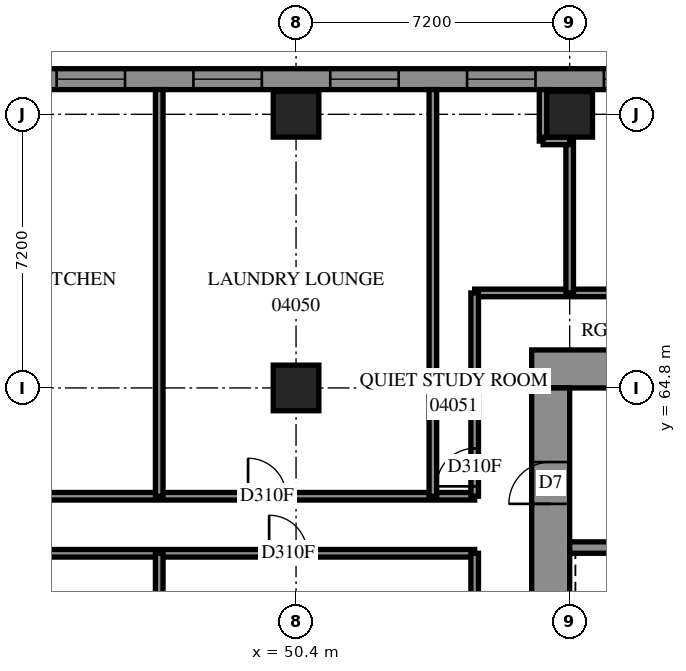
"""IFC4 building model, lengths in metres.
Left out: names, types, materials, properties, quantities, classifications, styles, units other than length and angle.
Written with IfcOpenShell. Run it as: python <this file> out.ifc"""

import sys

from ifc_helpers import new_model, si_unit, direction, frame, frame_2d, origin, origin_2d, place, context, subcontext, project, spatial, polyline, rectangle, outline, extrude, element, fill, save


model = new_model("IFC4")
c1 = context("Model", 3, precision=1e-05, world=origin(), true_north=direction((0.0, 1.0)))
c2 = subcontext(c1, "Body", "Model", "MODEL_VIEW")
j1 = project(units=[si_unit("LENGTHUNIT", "METRE"), si_unit("PLANEANGLEUNIT", "RADIAN")], contexts=[c1])
p1 = place(None, origin())
s1 = spatial("IfcSite", under=j1, at=p1, CompositionType="ELEMENT")
p2 = place(p1, origin())
s2 = spatial("IfcBuilding", under=s1, at=p2, CompositionType="ELEMENT")
p3 = place(p2, frame((0.0, 0.0, 18.6)))
s3 = spatial("IfcBuildingStorey", under=s2, at=p3, CompositionType="ELEMENT", Elevation=18.6)
for number, where, z_axis, x_axis in (
    (1, (50.4, 64.8, 0.0), (0.0, 0.0, 1.0), (1.0, 0.0, 0.0)),
    (2, (50.4, 72.0, 0.0), (0.0, 0.0, 1.0), (1.0, 0.0, 0.0)),
    (3, (57.6, 72.0, 0.0), (0.0, 0.0, 1.0), (1.0, 0.0, 0.0)),
):
    element("IfcColumn", number, at=place(p3, frame(where, z_axis=z_axis, x_axis=x_axis)), inside=s3, PredefinedType="COLUMN", context=c2, shape_type="SweptSolid", body=[
        extrude(rectangle(XDim=1.2, YDim=1.2, at=origin_2d()), origin(), (0.0, 0.0, 1.0), 3.8),
    ])
p4 = place(p3, frame((56.6, 65.3, -0.4), z_axis=(0.0, 0.0, 1.0), x_axis=(1.0, 0.0, 0.0)))
e4 = element("IfcWall", 4, at=p4, inside=s3, PredefinedType="SHEAR", context=c2, shape_type="SweptSolid", body=[
    extrude(rectangle(XDim=16.4, YDim=1.0, at=frame_2d((8.2, 0.0))), origin(), (0.0, 0.0, 1.0), 3.5),
])
p5 = place(p4, frame((11.0, 0.0, 0.4)))
e5 = element("IfcOpeningElement", 5, at=p5, cuts=e4, PredefinedType="OPENING", context=c2, shape_type="SweptSolid", body=[
    extrude(rectangle(XDim=0.8, YDim=2.1, at=frame_2d((0.4, 1.05))), frame((0.0, 0.51, 0.0), z_axis=(0.0, -1.0, 0.0), x_axis=(1.0, 0.0, 0.0)), (0.0, 0.0, 1.0), 1.02),
])
p6 = place(p3, frame((57.1, 50.4, -0.4), z_axis=(0.0, 0.0, 1.0), x_axis=(0.0, 1.0, 0.0)))
e6 = element("IfcWall", 6, at=p6, inside=s3, PredefinedType="SHEAR", context=c2, shape_type="SweptSolid", body=[
    extrude(rectangle(XDim=14.4, YDim=1.0, at=frame_2d((7.2, 0.0))), origin(), (0.0, 0.0, 1.0), 3.5),
])
p7 = place(p6, frame((4.55, 0.0, 0.4)))
e7 = element("IfcOpeningElement", 7, at=p7, cuts=e6, PredefinedType="OPENING", context=c2, shape_type="SweptSolid", body=[
    extrude(rectangle(XDim=1.1, YDim=2.1, at=frame_2d((0.55, 1.05))), frame((0.0, 0.51, 0.0), z_axis=(0.0, -1.0, 0.0), x_axis=(1.0, 0.0, 0.0)), (0.0, 0.0, 1.0), 1.02),
])
p8 = place(p6, frame((11.35, 0.0, 0.4)))
e8 = element("IfcOpeningElement", 8, at=p8, cuts=e6, PredefinedType="OPENING", context=c2, shape_type="SweptSolid", body=[
    extrude(rectangle(XDim=1.1, YDim=2.1, at=frame_2d((0.55, 1.05))), frame((0.0, 0.51, 0.0), z_axis=(0.0, -1.0, 0.0), x_axis=(1.0, 0.0, 0.0)), (0.0, 0.0, 1.0), 1.02),
])
p9 = place(p3, frame((57.6, 60.6, 0.0), z_axis=(0.0, 0.0, 1.0), x_axis=(1.0, 0.0, 0.0)))
e9 = element("IfcWall", 9, at=p9, inside=s3, PredefinedType="SOLIDWALL", context=c2, shape_type="SweptSolid", body=[
    extrude(rectangle(XDim=7.2, YDim=0.3, at=frame_2d((3.6, 0.0))), origin(), (0.0, 0.0, 1.0), 3.8),
])
p10 = place(p3, frame((79.583, 72.925, 0.0), z_axis=(0.0, 0.0, 1.0), x_axis=(-1.0, 0.0, 0.0)))
e10 = element("IfcWall", 10, at=p10, inside=s3, PredefinedType="SOLIDWALL", context=c2, shape_type="SweptSolid", body=[
    extrude(outline(polyline([(-0.114, -0.275), (79.583, -0.275), (79.033, 0.275), (0.114, 0.275), (-0.114, -0.275)])), origin(), (0.0, 0.0, 1.0), 3.8),
])
p11 = place(p10, frame((1.249, 0.0, 0.7)))
e11 = element("IfcOpeningElement", 11, at=p11, cuts=e10, PredefinedType="OPENING", context=c2, shape_type="SweptSolid", body=[
    extrude(rectangle(XDim=1.8, YDim=2.4, at=frame_2d((0.9, 1.2))), frame((0.0, 0.285, 0.0), z_axis=(0.0, -1.0, 0.0), x_axis=(1.0, 0.0, 0.0)), (0.0, 0.0, 1.0), 0.57),
])
p12 = place(p10, frame((4.883, 0.0, 0.7)))
e12 = element("IfcOpeningElement", 12, at=p12, cuts=e10, PredefinedType="OPENING", context=c2, shape_type="SweptSolid", body=[
    extrude(rectangle(XDim=1.8, YDim=2.4, at=frame_2d((0.9, 1.2))), frame((0.0, 0.285, 0.0), z_axis=(0.0, -1.0, 0.0), x_axis=(1.0, 0.0, 0.0)), (0.0, 0.0, 1.0), 0.57),
])
p13 = place(p10, frame((8.483, 0.0, 0.7)))
e13 = element("IfcOpeningElement", 13, at=p13, cuts=e10, PredefinedType="OPENING", context=c2, shape_type="SweptSolid", body=[
    extrude(rectangle(XDim=1.8, YDim=2.4, at=frame_2d((0.9, 1.2))), frame((0.0, 0.285, 0.0), z_axis=(0.0, -1.0, 0.0), x_axis=(1.0, 0.0, 0.0)), (0.0, 0.0, 1.0), 0.57),
])
p14 = place(p10, frame((12.083, 0.0, 0.7)))
e14 = element("IfcOpeningElement", 14, at=p14, cuts=e10, PredefinedType="OPENING", context=c2, shape_type="SweptSolid", body=[
    extrude(rectangle(XDim=1.8, YDim=2.4, at=frame_2d((0.9, 1.2))), frame((0.0, 0.285, 0.0), z_axis=(0.0, -1.0, 0.0), x_axis=(1.0, 0.0, 0.0)), (0.0, 0.0, 1.0), 0.57),
])
p15 = place(p10, frame((15.683, 0.0, 0.7)))
e15 = element("IfcOpeningElement", 15, at=p15, cuts=e10, PredefinedType="OPENING", context=c2, shape_type="SweptSolid", body=[
    extrude(rectangle(XDim=1.8, YDim=2.4, at=frame_2d((0.9, 1.2))), frame((0.0, 0.285, 0.0), z_axis=(0.0, -1.0, 0.0), x_axis=(1.0, 0.0, 0.0)), (0.0, 0.0, 1.0), 0.57),
])
p16 = place(p10, frame((19.283, 0.0, 0.7)))
e16 = element("IfcOpeningElement", 16, at=p16, cuts=e10, PredefinedType="OPENING", context=c2, shape_type="SweptSolid", body=[
    extrude(rectangle(XDim=1.8, YDim=2.4, at=frame_2d((0.9, 1.2))), frame((0.0, 0.285, 0.0), z_axis=(0.0, -1.0, 0.0), x_axis=(1.0, 0.0, 0.0)), (0.0, 0.0, 1.0), 0.57),
])
p17 = place(p10, frame((22.883, 0.0, 0.7)))
e17 = element("IfcOpeningElement", 17, at=p17, cuts=e10, PredefinedType="OPENING", context=c2, shape_type="SweptSolid", body=[
    extrude(rectangle(XDim=1.8, YDim=2.4, at=frame_2d((0.9, 1.2))), frame((0.0, 0.285, 0.0), z_axis=(0.0, -1.0, 0.0), x_axis=(1.0, 0.0, 0.0)), (0.0, 0.0, 1.0), 0.57),
])
p18 = place(p10, frame((26.483, 0.0, 0.7)))
e18 = element("IfcOpeningElement", 18, at=p18, cuts=e10, PredefinedType="OPENING", context=c2, shape_type="SweptSolid", body=[
    extrude(rectangle(XDim=1.8, YDim=2.4, at=frame_2d((0.9, 1.2))), frame((0.0, 0.285, 0.0), z_axis=(0.0, -1.0, 0.0), x_axis=(1.0, 0.0, 0.0)), (0.0, 0.0, 1.0), 0.57),
])
p19 = place(p10, frame((30.083, 0.0, 0.7)))
e19 = element("IfcOpeningElement", 19, at=p19, cuts=e10, PredefinedType="OPENING", context=c2, shape_type="SweptSolid", body=[
    extrude(rectangle(XDim=1.8, YDim=2.4, at=frame_2d((0.9, 1.2))), frame((0.0, 0.285, 0.0), z_axis=(0.0, -1.0, 0.0), x_axis=(1.0, 0.0, 0.0)), (0.0, 0.0, 1.0), 0.57),
])
p20 = place(p10, frame((33.683, 0.0, 0.7)))
e20 = element("IfcOpeningElement", 20, at=p20, cuts=e10, PredefinedType="OPENING", context=c2, shape_type="SweptSolid", body=[
    extrude(rectangle(XDim=1.8, YDim=2.4, at=frame_2d((0.9, 1.2))), frame((0.0, 0.285, 0.0), z_axis=(0.0, -1.0, 0.0), x_axis=(1.0, 0.0, 0.0)), (0.0, 0.0, 1.0), 0.57),
])
p21 = place(p10, frame((37.283, 0.0, 0.7)))
e21 = element("IfcOpeningElement", 21, at=p21, cuts=e10, PredefinedType="OPENING", context=c2, shape_type="SweptSolid", body=[
    extrude(rectangle(XDim=1.8, YDim=2.4, at=frame_2d((0.9, 1.2))), frame((0.0, 0.285, 0.0), z_axis=(0.0, -1.0, 0.0), x_axis=(1.0, 0.0, 0.0)), (0.0, 0.0, 1.0), 0.57),
])
p22 = place(p10, frame((40.883, 0.0, 0.7)))
e22 = element("IfcOpeningElement", 22, at=p22, cuts=e10, PredefinedType="OPENING", context=c2, shape_type="SweptSolid", body=[
    extrude(rectangle(XDim=1.8, YDim=2.4, at=frame_2d((0.9, 1.2))), frame((0.0, 0.285, 0.0), z_axis=(0.0, -1.0, 0.0), x_axis=(1.0, 0.0, 0.0)), (0.0, 0.0, 1.0), 0.57),
])
p23 = place(p10, frame((44.483, 0.0, 0.7)))
e23 = element("IfcOpeningElement", 23, at=p23, cuts=e10, PredefinedType="OPENING", context=c2, shape_type="SweptSolid", body=[
    extrude(rectangle(XDim=1.8, YDim=2.4, at=frame_2d((0.9, 1.2))), frame((0.0, 0.285, 0.0), z_axis=(0.0, -1.0, 0.0), x_axis=(1.0, 0.0, 0.0)), (0.0, 0.0, 1.0), 0.57),
])
p24 = place(p10, frame((48.083, 0.0, 0.7)))
e24 = element("IfcOpeningElement", 24, at=p24, cuts=e10, PredefinedType="OPENING", context=c2, shape_type="SweptSolid", body=[
    extrude(rectangle(XDim=1.8, YDim=2.4, at=frame_2d((0.9, 1.2))), frame((0.0, 0.285, 0.0), z_axis=(0.0, -1.0, 0.0), x_axis=(1.0, 0.0, 0.0)), (0.0, 0.0, 1.0), 0.57),
])
p25 = place(p10, frame((51.683, 0.0, 0.7)))
e25 = element("IfcOpeningElement", 25, at=p25, cuts=e10, PredefinedType="OPENING", context=c2, shape_type="SweptSolid", body=[
    extrude(rectangle(XDim=1.8, YDim=2.4, at=frame_2d((0.9, 1.2))), frame((0.0, 0.285, 0.0), z_axis=(0.0, -1.0, 0.0), x_axis=(1.0, 0.0, 0.0)), (0.0, 0.0, 1.0), 0.57),
])
p26 = place(p10, frame((55.283, 0.0, 0.7)))
e26 = element("IfcOpeningElement", 26, at=p26, cuts=e10, PredefinedType="OPENING", context=c2, shape_type="SweptSolid", body=[
    extrude(rectangle(XDim=1.8, YDim=2.4, at=frame_2d((0.9, 1.2))), frame((0.0, 0.285, 0.0), z_axis=(0.0, -1.0, 0.0), x_axis=(1.0, 0.0, 0.0)), (0.0, 0.0, 1.0), 0.57),
])
p27 = place(p10, frame((58.883, 0.0, 0.7)))
e27 = element("IfcOpeningElement", 27, at=p27, cuts=e10, PredefinedType="OPENING", context=c2, shape_type="SweptSolid", body=[
    extrude(rectangle(XDim=1.8, YDim=2.4, at=frame_2d((0.9, 1.2))), frame((0.0, 0.285, 0.0), z_axis=(0.0, -1.0, 0.0), x_axis=(1.0, 0.0, 0.0)), (0.0, 0.0, 1.0), 0.57),
])
p28 = place(p10, frame((62.483, 0.0, 0.7)))
e28 = element("IfcOpeningElement", 28, at=p28, cuts=e10, PredefinedType="OPENING", context=c2, shape_type="SweptSolid", body=[
    extrude(rectangle(XDim=1.8, YDim=2.4, at=frame_2d((0.9, 1.2))), frame((0.0, 0.285, 0.0), z_axis=(0.0, -1.0, 0.0), x_axis=(1.0, 0.0, 0.0)), (0.0, 0.0, 1.0), 0.57),
])
p29 = place(p10, frame((66.083, 0.0, 0.7)))
e29 = element("IfcOpeningElement", 29, at=p29, cuts=e10, PredefinedType="OPENING", context=c2, shape_type="SweptSolid", body=[
    extrude(rectangle(XDim=1.8, YDim=2.4, at=frame_2d((0.9, 1.2))), frame((0.0, 0.285, 0.0), z_axis=(0.0, -1.0, 0.0), x_axis=(1.0, 0.0, 0.0)), (0.0, 0.0, 1.0), 0.57),
])
p30 = place(p10, frame((69.683, 0.0, 0.7)))
e30 = element("IfcOpeningElement", 30, at=p30, cuts=e10, PredefinedType="OPENING", context=c2, shape_type="SweptSolid", body=[
    extrude(rectangle(XDim=1.8, YDim=2.4, at=frame_2d((0.9, 1.2))), frame((0.0, 0.285, 0.0), z_axis=(0.0, -1.0, 0.0), x_axis=(1.0, 0.0, 0.0)), (0.0, 0.0, 1.0), 0.57),
])
p31 = place(p10, frame((73.683, 0.0, 0.7)))
e31 = element("IfcOpeningElement", 31, at=p31, cuts=e10, PredefinedType="OPENING", context=c2, shape_type="SweptSolid", body=[
    extrude(rectangle(XDim=1.8, YDim=2.4, at=frame_2d((0.9, 1.2))), frame((0.0, 0.285, 0.0), z_axis=(0.0, -1.0, 0.0), x_axis=(1.0, 0.0, 0.0)), (0.0, 0.0, 1.0), 0.57),
])
p32 = place(p10, frame((76.508, 0.0, 0.7)))
e32 = element("IfcOpeningElement", 32, at=p32, cuts=e10, PredefinedType="OPENING", context=c2, shape_type="SweptSolid", body=[
    extrude(rectangle(XDim=1.8, YDim=2.4, at=frame_2d((0.9, 1.2))), frame((0.0, 0.285, 0.0), z_axis=(0.0, -1.0, 0.0), x_axis=(1.0, 0.0, 0.0)), (0.0, 0.0, 1.0), 0.57),
])
p33 = place(p3, frame((0.002, 60.45, 0.0), z_axis=(0.0, 0.0, 1.0), x_axis=(1.0, 0.0, 0.0)))
e33 = element("IfcWall", 33, at=p33, inside=s3, PredefinedType="PARTITIONING", context=c2, shape_type="SweptSolid", body=[
    extrude(rectangle(XDim=55.098, YDim=0.2, at=frame_2d((27.549, 0.0))), origin(), (0.0, 0.0, 1.0), 3.8),
])
p34 = place(p33, frame((49.69, 0.0, 0.0)))
e34 = element("IfcOpeningElement", 34, at=p34, cuts=e33, PredefinedType="OPENING", context=c2, shape_type="SweptSolid", body=[
    extrude(rectangle(XDim=1.0, YDim=2.1, at=frame_2d((0.5, 1.05))), frame((0.0, 0.11, 0.0), z_axis=(0.0, -1.0, 0.0), x_axis=(1.0, 0.0, 0.0)), (0.0, 0.0, 1.0), 0.22),
])
p35 = place(p33, frame((3.897, 0.0, 0.0)))
e35 = element("IfcOpeningElement", 35, at=p35, cuts=e33, PredefinedType="OPENING", context=c2, shape_type="SweptSolid", body=[
    extrude(rectangle(XDim=1.0, YDim=2.1, at=frame_2d((0.5, 1.05))), frame((0.0, 0.11, 0.0), z_axis=(0.0, -1.0, 0.0), x_axis=(1.0, 0.0, 0.0)), (0.0, 0.0, 1.0), 0.22),
])
p36 = place(p3, frame((0.002, 61.95, 0.0), z_axis=(0.0, 0.0, 1.0), x_axis=(1.0, 0.0, 0.0)))
e36 = element("IfcWall", 36, at=p36, inside=s3, PredefinedType="PARTITIONING", context=c2, shape_type="SweptSolid", body=[
    extrude(rectangle(XDim=55.098, YDim=0.2, at=frame_2d((27.549, 0.0))), origin(), (0.0, 0.0, 1.0), 3.8),
])
p37 = place(p36, frame((8.667, 0.0, 0.0)))
e37 = element("IfcOpeningElement", 37, at=p37, cuts=e36, PredefinedType="OPENING", context=c2, shape_type="SweptSolid", body=[
    extrude(rectangle(XDim=1.0, YDim=2.1, at=frame_2d((0.5, 1.05))), frame((0.0, 0.11, 0.0), z_axis=(0.0, -1.0, 0.0), x_axis=(1.0, 0.0, 0.0)), (0.0, 0.0, 1.0), 0.22),
])
p38 = place(p36, frame((13.136, 0.0, 0.0)))
e38 = element("IfcOpeningElement", 38, at=p38, cuts=e36, PredefinedType="OPENING", context=c2, shape_type="SweptSolid", body=[
    extrude(rectangle(XDim=1.0, YDim=2.1, at=frame_2d((0.5, 1.05))), frame((0.0, 0.11, 0.0), z_axis=(0.0, -1.0, 0.0), x_axis=(1.0, 0.0, 0.0)), (0.0, 0.0, 1.0), 0.22),
])
p39 = place(p36, frame((20.335, 0.0, 0.0)))
e39 = element("IfcOpeningElement", 39, at=p39, cuts=e36, PredefinedType="OPENING", context=c2, shape_type="SweptSolid", body=[
    extrude(rectangle(XDim=1.0, YDim=2.1, at=frame_2d((0.5, 1.05))), frame((0.0, 0.11, 0.0), z_axis=(0.0, -1.0, 0.0), x_axis=(1.0, 0.0, 0.0)), (0.0, 0.0, 1.0), 0.22),
])
p40 = place(p36, frame((27.535, 0.0, 0.0)))
e40 = element("IfcOpeningElement", 40, at=p40, cuts=e36, PredefinedType="OPENING", context=c2, shape_type="SweptSolid", body=[
    extrude(rectangle(XDim=1.0, YDim=2.1, at=frame_2d((0.5, 1.05))), frame((0.0, 0.11, 0.0), z_axis=(0.0, -1.0, 0.0), x_axis=(1.0, 0.0, 0.0)), (0.0, 0.0, 1.0), 0.22),
])
p41 = place(p36, frame((34.736, 0.0, 0.0)))
e41 = element("IfcOpeningElement", 41, at=p41, cuts=e36, PredefinedType="OPENING", context=c2, shape_type="SweptSolid", body=[
    extrude(rectangle(XDim=1.0, YDim=2.1, at=frame_2d((0.5, 1.05))), frame((0.0, 0.11, 0.0), z_axis=(0.0, -1.0, 0.0), x_axis=(1.0, 0.0, 0.0)), (0.0, 0.0, 1.0), 0.22),
])
p42 = place(p36, frame((41.935, 0.0, 0.0)))
e42 = element("IfcOpeningElement", 42, at=p42, cuts=e36, PredefinedType="OPENING", context=c2, shape_type="SweptSolid", body=[
    extrude(rectangle(XDim=1.0, YDim=2.1, at=frame_2d((0.5, 1.05))), frame((0.0, 0.11, 0.0), z_axis=(0.0, -1.0, 0.0), x_axis=(1.0, 0.0, 0.0)), (0.0, 0.0, 1.0), 0.22),
])
p43 = place(p36, frame((49.136, 0.0, 0.0)))
e43 = element("IfcOpeningElement", 43, at=p43, cuts=e36, PredefinedType="OPENING", context=c2, shape_type="SweptSolid", body=[
    extrude(rectangle(XDim=1.0, YDim=2.1, at=frame_2d((0.5, 1.05))), frame((0.0, 0.11, 0.0), z_axis=(0.0, -1.0, 0.0), x_axis=(1.0, 0.0, 0.0)), (0.0, 0.0, 1.0), 0.22),
])
p44 = place(p36, frame((4.799, 0.0, 0.0)))
e44 = element("IfcOpeningElement", 44, at=p44, cuts=e36, PredefinedType="OPENING", context=c2, shape_type="SweptSolid", body=[
    extrude(rectangle(XDim=1.0, YDim=2.1, at=frame_2d((0.5, 1.05))), frame((0.0, 0.11, 0.0), z_axis=(0.0, -1.0, 0.0), x_axis=(1.0, 0.0, 0.0)), (0.0, 0.0, 1.0), 0.22),
])
p45 = place(p3, frame((55.1, 67.3, 0.0), z_axis=(0.0, 0.0, 1.0), x_axis=(1.0, 0.0, 0.0)))
e45 = element("IfcWall", 45, at=p45, inside=s3, PredefinedType="PARTITIONING", context=c2, shape_type="SweptSolid", body=[
    extrude(rectangle(XDim=19.4, YDim=0.2, at=frame_2d((9.7, 0.0))), origin(), (0.0, 0.0, 1.0), 3.8),
])
p46 = place(p45, frame((6.058, 0.0, 0.0)))
e46 = element("IfcOpeningElement", 46, at=p46, cuts=e45, PredefinedType="OPENING", context=c2, shape_type="SweptSolid", body=[
    extrude(rectangle(XDim=1.0, YDim=2.1, at=frame_2d((0.5, 1.05))), frame((0.0, 0.11, 0.0), z_axis=(0.0, -1.0, 0.0), x_axis=(1.0, 0.0, 0.0)), (0.0, 0.0, 1.0), 0.22),
])
p47 = place(p45, frame((13.562, 0.0, 0.0)))
e47 = element("IfcOpeningElement", 47, at=p47, cuts=e45, PredefinedType="OPENING", context=c2, shape_type="SweptSolid", body=[
    extrude(rectangle(XDim=1.0, YDim=2.1, at=frame_2d((0.5, 1.05))), frame((0.0, 0.11, 0.0), z_axis=(0.0, -1.0, 0.0), x_axis=(1.0, 0.0, 0.0)), (0.0, 0.0, 1.0), 0.22),
])
for number, where, z_axis, x_axis in (
    (48, (46.8, 61.95, 0.0), (0.0, 0.0, 1.0), (0.0, 1.0, 0.0)),
    (49, (54.0, 61.95, 0.0), (0.0, 0.0, 1.0), (0.0, 1.0, 0.0)),
):
    element("IfcWall", number, at=place(p3, frame(where, z_axis=z_axis, x_axis=x_axis)), inside=s3, PredefinedType="PARTITIONING", context=c2, shape_type="SweptSolid", body=[
        extrude(rectangle(XDim=10.7, YDim=0.2, at=frame_2d((5.35, 0.0))), origin(), (0.0, 0.0, 1.0), 3.8),
    ])
p48 = place(p3, frame((46.8, 54.75, 0.0), z_axis=(0.0, 0.0, 1.0), x_axis=(0.0, 1.0, 0.0)))
e50 = element("IfcWall", 50, at=p48, inside=s3, PredefinedType="PARTITIONING", context=c2, shape_type="SweptSolid", body=[
    extrude(rectangle(XDim=5.7, YDim=0.2, at=frame_2d((2.85, 0.0))), origin(), (0.0, 0.0, 1.0), 3.8),
])
p49 = place(p3, frame((55.1, 54.752, 0.0), z_axis=(0.0, 0.0, 1.0), x_axis=(0.0, 1.0, 0.0)))
e51 = element("IfcWall", 51, at=p49, inside=s3, PredefinedType="PARTITIONING", context=c2, shape_type="SweptSolid", body=[
    extrude(rectangle(XDim=5.698, YDim=0.2, at=frame_2d((2.849, 0.0))), origin(), (0.0, 0.0, 1.0), 3.8),
])
p50 = place(p3, frame((55.1, 61.952, 0.0), z_axis=(0.0, 0.0, 1.0), x_axis=(0.0, 1.0, 0.0)))
e52 = element("IfcWall", 52, at=p50, inside=s3, PredefinedType="PARTITIONING", context=c2, shape_type="SweptSolid", body=[
    extrude(rectangle(XDim=5.348, YDim=0.2, at=frame_2d((2.674, 0.0))), origin(), (0.0, 0.0, 1.0), 3.8),
])
p51 = place(p50, frame((0.259, 0.0, 0.0)))
e53 = element("IfcOpeningElement", 53, at=p51, cuts=e52, PredefinedType="OPENING", context=c2, shape_type="SweptSolid", body=[
    extrude(rectangle(XDim=1.0, YDim=2.1, at=frame_2d((0.5, 1.05))), frame((0.0, 0.11, 0.0), z_axis=(0.0, -1.0, 0.0), x_axis=(1.0, 0.0, 0.0)), (0.0, 0.0, 1.0), 0.22),
])
p52 = place(p3, frame((57.6, 67.3, 0.0), z_axis=(0.0, 0.0, 1.0), x_axis=(0.0, 1.0, 0.0)))
e54 = element("IfcWall", 54, at=p52, inside=s3, PredefinedType="PARTITIONING", context=c2, shape_type="SweptSolid", body=[
    extrude(rectangle(XDim=3.996, YDim=0.2, at=frame_2d((1.998, 0.0))), origin(), (0.0, 0.0, 1.0), 3.8),
])
p53 = place(p3, frame((56.9, 71.296, 0.0), z_axis=(0.0, 0.0, 1.0), x_axis=(0.0, 1.0, 0.0)))
e55 = element("IfcWall", 55, at=p53, inside=s3, PredefinedType="PARTITIONING", context=c2, shape_type="SweptSolid", body=[
    extrude(rectangle(XDim=1.354, YDim=0.2, at=frame_2d((0.677, 0.0))), origin(), (0.0, 0.0, 1.0), 3.8),
])
p54 = place(p3, frame((56.9, 71.3, 0.0), z_axis=(0.0, 0.0, 1.0), x_axis=(1.0, 0.0, 0.0)))
e56 = element("IfcWall", 56, at=p54, inside=s3, PredefinedType="PARTITIONING", context=c2, shape_type="SweptSolid", body=[
    extrude(rectangle(XDim=0.7, YDim=0.2, at=frame_2d((0.35, 0.0))), origin(), (0.0, 0.0, 1.0), 3.8),
])
p55 = place(p16, origin())
e57 = element("IfcWindow", 57, at=p55, inside=s3, PartitioningType="SINGLE_PANEL", PredefinedType="WINDOW", context=c2, shape_type="SweptSolid", body=[
    extrude(rectangle(XDim=1.8, YDim=2.4, at=frame_2d((0.9, 1.2))), frame((0.0, 0.155, 0.0), z_axis=(0.0, -1.0, 0.0), x_axis=(1.0, 0.0, 0.0)), (0.0, 0.0, 1.0), 0.06),
])
fill(e16, e57)
p56 = place(p17, origin())
e58 = element("IfcWindow", 58, at=p56, inside=s3, PartitioningType="SINGLE_PANEL", PredefinedType="WINDOW", context=c2, shape_type="SweptSolid", body=[
    extrude(rectangle(XDim=1.8, YDim=2.4, at=frame_2d((0.9, 1.2))), frame((0.0, 0.155, 0.0), z_axis=(0.0, -1.0, 0.0), x_axis=(1.0, 0.0, 0.0)), (0.0, 0.0, 1.0), 0.06),
])
fill(e17, e58)
p57 = place(p18, origin())
e59 = element("IfcWindow", 59, at=p57, inside=s3, PartitioningType="SINGLE_PANEL", PredefinedType="WINDOW", context=c2, shape_type="SweptSolid", body=[
    extrude(rectangle(XDim=1.8, YDim=2.4, at=frame_2d((0.9, 1.2))), frame((0.0, 0.155, 0.0), z_axis=(0.0, -1.0, 0.0), x_axis=(1.0, 0.0, 0.0)), (0.0, 0.0, 1.0), 0.06),
])
fill(e18, e59)
p58 = place(p19, origin())
e60 = element("IfcWindow", 60, at=p58, inside=s3, PartitioningType="SINGLE_PANEL", PredefinedType="WINDOW", context=c2, shape_type="SweptSolid", body=[
    extrude(rectangle(XDim=1.8, YDim=2.4, at=frame_2d((0.9, 1.2))), frame((0.0, 0.155, 0.0), z_axis=(0.0, -1.0, 0.0), x_axis=(1.0, 0.0, 0.0)), (0.0, 0.0, 1.0), 0.06),
])
fill(e19, e60)
p59 = place(p20, origin())
e61 = element("IfcWindow", 61, at=p59, inside=s3, PartitioningType="SINGLE_PANEL", PredefinedType="WINDOW", context=c2, shape_type="SweptSolid", body=[
    extrude(rectangle(XDim=1.8, YDim=2.4, at=frame_2d((0.9, 1.2))), frame((0.0, 0.155, 0.0), z_axis=(0.0, -1.0, 0.0), x_axis=(1.0, 0.0, 0.0)), (0.0, 0.0, 1.0), 0.06),
])
fill(e20, e61)
p60 = place(p8, origin())
e62 = element("IfcDoor", 62, at=p60, inside=s3, OperationType="SINGLE_SWING_LEFT", PredefinedType="DOOR", context=c2, shape_type="SweptSolid", body=[
    extrude(rectangle(XDim=1.1, YDim=2.1, at=frame_2d((0.55, 1.05))), frame((0.0, 0.025, 0.0), z_axis=(0.0, -1.0, 0.0), x_axis=(1.0, 0.0, 0.0)), (0.0, 0.0, 1.0), 0.05),
])
fill(e8, e62)
p61 = place(p34, origin())
e63 = element("IfcDoor", 63, at=p61, inside=s3, OperationType="SINGLE_SWING_RIGHT", PredefinedType="DOOR", context=c2, shape_type="SweptSolid", body=[
    extrude(rectangle(XDim=1.0, YDim=2.1, at=frame_2d((0.5, 1.05))), frame((0.0, 0.025, 0.0), z_axis=(0.0, -1.0, 0.0), x_axis=(1.0, 0.0, 0.0)), (0.0, 0.0, 1.0), 0.05),
])
fill(e34, e63)
p62 = place(p43, origin())
e64 = element("IfcDoor", 64, at=p62, inside=s3, OperationType="SINGLE_SWING_LEFT", PredefinedType="DOOR", context=c2, shape_type="SweptSolid", body=[
    extrude(rectangle(XDim=1.0, YDim=2.1, at=frame_2d((0.5, 1.05))), frame((0.0, 0.025, 0.0), z_axis=(0.0, -1.0, 0.0), x_axis=(1.0, 0.0, 0.0)), (0.0, 0.0, 1.0), 0.05),
])
fill(e43, e64)
p63 = place(p51, origin())
e65 = element("IfcDoor", 65, at=p63, inside=s3, OperationType="SINGLE_SWING_LEFT", PredefinedType="DOOR", context=c2, shape_type="SweptSolid", body=[
    extrude(rectangle(XDim=1.0, YDim=2.1, at=frame_2d((0.5, 1.05))), frame((0.0, 0.025, 0.0), z_axis=(0.0, -1.0, 0.0), x_axis=(1.0, 0.0, 0.0)), (0.0, 0.0, 1.0), 0.05),
])
fill(e53, e65)
save(model, sys.argv[1])
